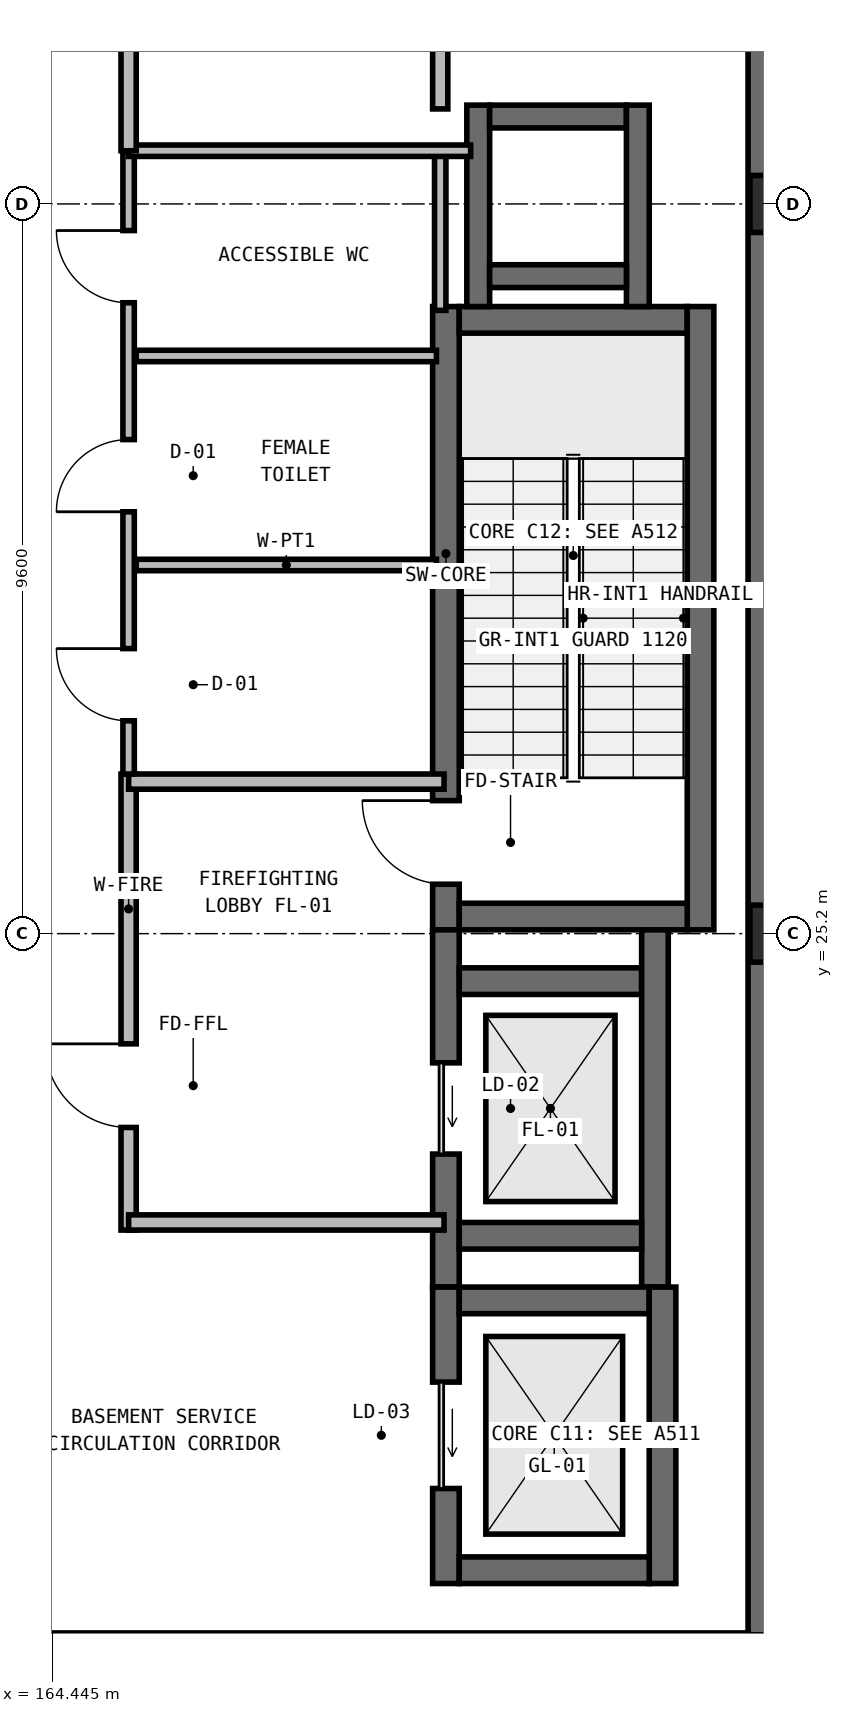
"""IFC4 building model, lengths in metres.
Left out: names, types, materials, properties, quantities, classifications, styles, units other than length and angle.
Written with IfcOpenShell. Run it as: python <this file> out.ifc"""

import sys

from ifc_helpers import new_model, si_unit, direction, frame, frame_2d, origin, origin_2d, place, context, subcontext, project, spatial, rectangle, extrude, element, fill, save


model = new_model("IFC4")
c1 = context("Model", 3, precision=1e-05, world=origin(), true_north=direction((0.0, 1.0)))
c2 = subcontext(c1, "Body", "Model", "MODEL_VIEW")
j1 = project(units=[si_unit("LENGTHUNIT", "METRE"), si_unit("PLANEANGLEUNIT", "RADIAN")], contexts=[c1])
p1 = place(None, origin())
s1 = spatial("IfcSite", under=j1, at=p1, CompositionType="ELEMENT")
p2 = place(p1, origin())
s2 = spatial("IfcBuilding", under=s1, at=p2, CompositionType="ELEMENT")
p3 = place(p2, frame((0.0, 0.0, -5.25)))
s3 = spatial("IfcBuildingStorey", under=s2, at=p3, CompositionType="ELEMENT", Elevation=-5.25)
p4 = place(p3, frame((169.625, 25.25, 0.0), z_axis=(0.0, 0.0, 1.0), x_axis=(0.0, 1.0, 0.0)))
e1 = element("IfcWall", 1, at=p4, inside=s3, PredefinedType="SHEAR", context=c2, shape_type="SweptSolid", body=[
    extrude(rectangle(XDim=8.2, YDim=0.35, at=frame_2d((4.1, 0.0))), origin(), (0.0, 0.0, 1.0), 5.25),
])
p5 = place(p4, frame((0.6, 0.0, 0.0)))
e2 = element("IfcOpeningElement", 2, at=p5, cuts=e1, PredefinedType="OPENING", context=c2, shape_type="SweptSolid", body=[
    extrude(rectangle(XDim=1.1, YDim=2.15, at=frame_2d((0.55, 1.075))), frame((0.0, 0.185, 0.0), z_axis=(0.0, -1.0, 0.0), x_axis=(1.0, 0.0, 0.0)), (0.0, 0.0, 1.0), 0.37),
])
p6 = place(p3, frame((169.8, 33.275, 0.0), z_axis=(0.0, 0.0, 1.0), x_axis=(1.0, 0.0, 0.0)))
e3 = element("IfcWall", 3, at=p6, inside=s3, PredefinedType="SHEAR", context=c2, shape_type="SweptSolid", body=[
    extrude(rectangle(XDim=3.0, YDim=0.35, at=frame_2d((1.5, 0.0))), origin(), (0.0, 0.0, 1.0), 5.25),
])
p7 = place(p3, frame((172.975, 33.45, 0.0), z_axis=(0.0, 0.0, 1.0), x_axis=(0.0, -1.0, 0.0)))
e4 = element("IfcWall", 4, at=p7, inside=s3, PredefinedType="SHEAR", context=c2, shape_type="SweptSolid", body=[
    extrude(rectangle(XDim=8.2, YDim=0.35, at=frame_2d((4.1, 0.0))), origin(), (0.0, 0.0, 1.0), 5.25),
])
p8 = place(p3, frame((172.8, 25.425, 0.0), z_axis=(0.0, 0.0, 1.0), x_axis=(-1.0, 0.0, 0.0)))
e5 = element("IfcWall", 5, at=p8, inside=s3, PredefinedType="SHEAR", context=c2, shape_type="SweptSolid", body=[
    extrude(rectangle(XDim=3.0, YDim=0.35, at=frame_2d((1.5, 0.0))), origin(), (0.0, 0.0, 1.0), 5.25),
])
p9 = place(p3, frame((169.625, 20.55, 0.0), z_axis=(0.0, 0.0, 1.0), x_axis=(0.0, 1.0, 0.0)))
e6 = element("IfcWall", 6, at=p9, inside=s3, PredefinedType="SHEAR", context=c2, shape_type="SweptSolid", body=[
    extrude(rectangle(XDim=4.7, YDim=0.35, at=frame_2d((2.35, 0.0))), origin(), (0.0, 0.0, 1.0), 5.25),
])
p10 = place(p9, frame((1.75, 0.0, 0.0)))
e7 = element("IfcOpeningElement", 7, at=p10, cuts=e6, PredefinedType="OPENING", context=c2, shape_type="SweptSolid", body=[
    extrude(rectangle(XDim=1.2, YDim=2.15, at=frame_2d((0.6, 1.075))), frame((0.0, 0.185, 0.0), z_axis=(0.0, -1.0, 0.0), x_axis=(1.0, 0.0, 0.0)), (0.0, 0.0, 1.0), 0.37),
])
p11 = place(p3, frame((169.8, 24.575, 0.0), z_axis=(0.0, 0.0, 1.0), x_axis=(1.0, 0.0, 0.0)))
e8 = element("IfcWall", 8, at=p11, inside=s3, PredefinedType="SHEAR", context=c2, shape_type="SweptSolid", body=[
    extrude(rectangle(XDim=2.4, YDim=0.35, at=frame_2d((1.2, 0.0))), origin(), (0.0, 0.0, 1.0), 5.25),
])
p12 = place(p3, frame((172.375, 25.25, 0.0), z_axis=(0.0, 0.0, 1.0), x_axis=(0.0, -1.0, 0.0)))
e9 = element("IfcWall", 9, at=p12, inside=s3, PredefinedType="SHEAR", context=c2, shape_type="SweptSolid", body=[
    extrude(rectangle(XDim=4.7, YDim=0.35, at=frame_2d((2.35, 0.0))), origin(), (0.0, 0.0, 1.0), 5.25),
])
p13 = place(p3, frame((172.2, 21.225, 0.0), z_axis=(0.0, 0.0, 1.0), x_axis=(-1.0, 0.0, 0.0)))
e10 = element("IfcWall", 10, at=p13, inside=s3, PredefinedType="SHEAR", context=c2, shape_type="SweptSolid", body=[
    extrude(rectangle(XDim=2.4, YDim=0.35, at=frame_2d((1.2, 0.0))), origin(), (0.0, 0.0, 1.0), 5.25),
])
p14 = place(p3, frame((169.625, 16.65, 0.0), z_axis=(0.0, 0.0, 1.0), x_axis=(0.0, 1.0, 0.0)))
e11 = element("IfcWall", 11, at=p14, inside=s3, PredefinedType="SHEAR", context=c2, shape_type="SweptSolid", body=[
    extrude(rectangle(XDim=3.9, YDim=0.35, at=frame_2d((1.95, 0.0))), origin(), (0.0, 0.0, 1.0), 5.25),
])
p15 = place(p14, frame((1.25, 0.0, 0.0)))
e12 = element("IfcOpeningElement", 12, at=p15, cuts=e11, PredefinedType="OPENING", context=c2, shape_type="SweptSolid", body=[
    extrude(rectangle(XDim=1.4, YDim=2.3, at=frame_2d((0.7, 1.15))), frame((0.0, 0.185, 0.0), z_axis=(0.0, -1.0, 0.0), x_axis=(1.0, 0.0, 0.0)), (0.0, 0.0, 1.0), 0.37),
])
p16 = place(p3, frame((169.8, 20.375, 0.0), z_axis=(0.0, 0.0, 1.0), x_axis=(1.0, 0.0, 0.0)))
e13 = element("IfcWall", 13, at=p16, inside=s3, PredefinedType="SHEAR", context=c2, shape_type="SweptSolid", body=[
    extrude(rectangle(XDim=2.5, YDim=0.35, at=frame_2d((1.25, 0.0))), origin(), (0.0, 0.0, 1.0), 5.25),
])
p17 = place(p3, frame((172.475, 20.55, 0.0), z_axis=(0.0, 0.0, 1.0), x_axis=(0.0, -1.0, 0.0)))
e14 = element("IfcWall", 14, at=p17, inside=s3, PredefinedType="SHEAR", context=c2, shape_type="SweptSolid", body=[
    extrude(rectangle(XDim=3.9, YDim=0.35, at=frame_2d((1.95, 0.0))), origin(), (0.0, 0.0, 1.0), 5.25),
])
p18 = place(p3, frame((172.3, 16.825, 0.0), z_axis=(0.0, 0.0, 1.0), x_axis=(-1.0, 0.0, 0.0)))
e15 = element("IfcWall", 15, at=p18, inside=s3, PredefinedType="SHEAR", context=c2, shape_type="SweptSolid", body=[
    extrude(rectangle(XDim=2.5, YDim=0.35, at=frame_2d((1.25, 0.0))), origin(), (0.0, 0.0, 1.0), 5.25),
])
p19 = place(p3, frame((173.8, 70.8, 0.0), z_axis=(0.0, 0.0, 1.0), x_axis=(0.0, -1.0, 0.0)))
e16 = element("IfcWall", 16, at=p19, inside=s3, PredefinedType="USERDEFINED", context=c2, shape_type="SweptSolid", body=[
    extrude(rectangle(XDim=55.2, YDim=0.4, at=frame_2d((27.6, 0.0))), origin(), (0.0, 0.0, 1.0), 5.25),
])
for number, where, z_axis, x_axis in (
    (17, (174.0, 25.2, 0.0), (0.0, 0.0, 1.0), (1.0, 0.0, 0.0)),
    (18, (174.0, 34.8, 0.0), (0.0, 0.0, 1.0), (1.0, 0.0, 0.0)),
):
    element("IfcColumn", number, at=place(p3, frame(where, z_axis=z_axis, x_axis=x_axis)), inside=s3, PredefinedType="COLUMN", context=c2, shape_type="SweptSolid", body=[
        extrude(rectangle(XDim=0.75, YDim=0.75, at=origin_2d()), origin(), (0.0, 0.0, 1.0), 5.25),
    ])
p20 = place(p3, frame((170.05, 33.45, 0.0), z_axis=(0.0, 0.0, 1.0), x_axis=(0.0, 1.0, 0.0)))
e19 = element("IfcWall", 19, at=p20, inside=s3, PredefinedType="SHEAR", context=c2, shape_type="SweptSolid", body=[
    extrude(rectangle(XDim=2.65, YDim=0.3, at=frame_2d((1.325, 0.0))), origin(), (0.0, 0.0, 1.0), 5.07),
])
p21 = place(p3, frame((170.2, 35.95, 0.0), z_axis=(0.0, 0.0, 1.0), x_axis=(1.0, 0.0, 0.0)))
e20 = element("IfcWall", 20, at=p21, inside=s3, PredefinedType="SHEAR", context=c2, shape_type="SweptSolid", body=[
    extrude(rectangle(XDim=1.8, YDim=0.3, at=frame_2d((0.9, 0.0))), origin(), (0.0, 0.0, 1.0), 5.07),
])
p22 = place(p3, frame((172.15, 36.1, 0.0), z_axis=(0.0, 0.0, 1.0), x_axis=(0.0, -1.0, 0.0)))
e21 = element("IfcWall", 21, at=p22, inside=s3, PredefinedType="SHEAR", context=c2, shape_type="SweptSolid", body=[
    extrude(rectangle(XDim=2.65, YDim=0.3, at=frame_2d((1.325, 0.0))), origin(), (0.0, 0.0, 1.0), 5.07),
])
p23 = place(p3, frame((172.0, 33.85, 0.0), z_axis=(0.0, 0.0, 1.0), x_axis=(-1.0, 0.0, 0.0)))
e22 = element("IfcWall", 22, at=p23, inside=s3, PredefinedType="SHEAR", context=c2, shape_type="SweptSolid", body=[
    extrude(rectangle(XDim=1.8, YDim=0.3, at=frame_2d((0.9, 0.0))), origin(), (0.0, 0.0, 1.0), 5.07),
])
p24 = place(p3, frame((165.45, 21.3, 0.0), z_axis=(0.0, 0.0, 1.0), x_axis=(0.0, 1.0, 0.0)))
e23 = element("IfcWall", 23, at=p24, inside=s3, PredefinedType="SOLIDWALL", context=c2, shape_type="SweptSolid", body=[
    extrude(rectangle(XDim=6.0, YDim=0.2, at=frame_2d((3.0, 0.0))), origin(), (0.0, 0.0, 1.0), 5.0),
])
p25 = place(p24, frame((1.35, 0.0, 0.0)))
e24 = element("IfcOpeningElement", 24, at=p25, cuts=e23, PredefinedType="OPENING", context=c2, shape_type="SweptSolid", body=[
    extrude(rectangle(XDim=1.1, YDim=2.15, at=frame_2d((0.55, 1.075))), frame((0.0, 0.11, 0.0), z_axis=(0.0, -1.0, 0.0), x_axis=(1.0, 0.0, 0.0)), (0.0, 0.0, 1.0), 0.22),
])
for number, where, z_axis, x_axis in (
    (25, (165.45, 21.4, 0.0), (0.0, 0.0, 1.0), (1.0, 0.0, 0.0)),
    (26, (165.45, 27.2, 0.0), (0.0, 0.0, 1.0), (1.0, 0.0, 0.0)),
):
    element("IfcWall", number, at=place(p3, frame(where, z_axis=z_axis, x_axis=x_axis)), inside=s3, PredefinedType="SOLIDWALL", context=c2, shape_type="SweptSolid", body=[
        extrude(rectangle(XDim=4.15, YDim=0.2, at=frame_2d((2.075, 0.0))), origin(), (0.0, 0.0, 1.0), 5.0),
    ])
for number, where, z_axis, x_axis in (
    (27, (165.55, 30.05, 0.0), (0.0, 0.0, 1.0), (1.0, 0.0, 0.0)),
    (28, (165.55, 32.8, 0.0), (0.0, 0.0, 1.0), (1.0, 0.0, 0.0)),
):
    element("IfcWall", number, at=place(p3, frame(where, z_axis=z_axis, x_axis=x_axis)), inside=s3, PredefinedType="PARTITIONING", context=c2, shape_type="SweptSolid", body=[
        extrude(rectangle(XDim=3.95, YDim=0.15, at=frame_2d((1.975, 0.0))), origin(), (0.0, 0.0, 1.0), 5.0),
    ])
p26 = place(p3, frame((165.45, 27.3, 0.0), z_axis=(0.0, 0.0, 1.0), x_axis=(0.0, 1.0, 0.0)))
e29 = element("IfcWall", 29, at=p26, inside=s3, PredefinedType="PARTITIONING", context=c2, shape_type="SweptSolid", body=[
    extrude(rectangle(XDim=8.2, YDim=0.15, at=frame_2d((4.1, 0.0))), origin(), (0.0, 0.0, 1.0), 5.0),
])
p27 = place(p26, frame((0.7, 0.0, 0.0)))
e30 = element("IfcOpeningElement", 30, at=p27, cuts=e29, PredefinedType="OPENING", context=c2, shape_type="SweptSolid", body=[
    extrude(rectangle(XDim=0.95, YDim=2.1, at=frame_2d((0.475, 1.05))), frame((0.0, 0.085, 0.0), z_axis=(0.0, -1.0, 0.0), x_axis=(1.0, 0.0, 0.0)), (0.0, 0.0, 1.0), 0.17),
])
p28 = place(p26, frame((3.45, 0.0, 0.0)))
e31 = element("IfcOpeningElement", 31, at=p28, cuts=e29, PredefinedType="OPENING", context=c2, shape_type="SweptSolid", body=[
    extrude(rectangle(XDim=0.95, YDim=2.1, at=frame_2d((0.475, 1.05))), frame((0.0, 0.085, 0.0), z_axis=(0.0, -1.0, 0.0), x_axis=(1.0, 0.0, 0.0)), (0.0, 0.0, 1.0), 0.17),
])
p29 = place(p26, frame((6.2, 0.0, 0.0)))
e32 = element("IfcOpeningElement", 32, at=p29, cuts=e29, PredefinedType="OPENING", context=c2, shape_type="SweptSolid", body=[
    extrude(rectangle(XDim=0.95, YDim=2.1, at=frame_2d((0.475, 1.05))), frame((0.0, 0.085, 0.0), z_axis=(0.0, -1.0, 0.0), x_axis=(1.0, 0.0, 0.0)), (0.0, 0.0, 1.0), 0.17),
])
p30 = place(p3, frame((169.55, 33.4, 0.0), z_axis=(0.0, 0.0, 1.0), x_axis=(0.0, 1.0, 0.0)))
e33 = element("IfcWall", 33, at=p30, inside=s3, PredefinedType="PARTITIONING", context=c2, shape_type="SweptSolid", body=[
    extrude(rectangle(XDim=2.15, YDim=0.15, at=frame_2d((1.075, 0.0))), origin(), (0.0, 0.0, 1.0), 5.0),
])
p31 = place(p3, frame((165.45, 35.5, 0.0), z_axis=(0.0, 0.0, 1.0), x_axis=(1.0, 0.0, 0.0)))
e34 = element("IfcWall", 34, at=p31, inside=s3, PredefinedType="PARTITIONING", context=c2, shape_type="SweptSolid", body=[
    extrude(rectangle(XDim=4.5, YDim=0.15, at=frame_2d((2.25, 0.0))), origin(), (0.0, 0.0, 1.0), 5.0),
])
p32 = place(p3, frame((165.45, 35.5, 0.0), z_axis=(0.0, 0.0, 1.0), x_axis=(0.0, 1.0, 0.0)))
e35 = element("IfcWall", 35, at=p32, inside=s3, PredefinedType="SOLIDWALL", context=c2, shape_type="SweptSolid", body=[
    extrude(rectangle(XDim=9.7, YDim=0.2, at=frame_2d((4.85, 0.0))), origin(), (0.0, 0.0, 1.0), 5.0),
])
p33 = place(p32, frame((3.4, 0.0, 0.0)))
e36 = element("IfcOpeningElement", 36, at=p33, cuts=e35, PredefinedType="OPENING", context=c2, shape_type="SweptSolid", body=[
    extrude(rectangle(XDim=1.2, YDim=2.2, at=frame_2d((0.6, 1.1))), frame((0.0, 0.11, 0.0), z_axis=(0.0, -1.0, 0.0), x_axis=(1.0, 0.0, 0.0)), (0.0, 0.0, 1.0), 0.22),
])
p34 = place(p3, frame((169.55, 36.05, 0.0), z_axis=(0.0, 0.0, 1.0), x_axis=(0.0, 1.0, 0.0)))
e37 = element("IfcWall", 37, at=p34, inside=s3, PredefinedType="SOLIDWALL", context=c2, shape_type="SweptSolid", body=[
    extrude(rectangle(XDim=5.5, YDim=0.2, at=frame_2d((2.75, 0.0))), origin(), (0.0, 0.0, 1.0), 5.0),
])
p35 = place(p5, origin())
e38 = element("IfcDoor", 38, at=p35, inside=s3, OperationType="SINGLE_SWING_RIGHT", PredefinedType="DOOR", context=c2, shape_type="SweptSolid", body=[
    extrude(rectangle(XDim=1.1, YDim=2.15, at=frame_2d((0.55, 1.075))), frame((0.0, 0.025, 0.0), z_axis=(0.0, -1.0, 0.0), x_axis=(1.0, 0.0, 0.0)), (0.0, 0.0, 1.0), 0.05),
])
fill(e2, e38)
p36 = place(p10, origin())
e39 = element("IfcDoor", 39, at=p36, inside=s3, OperationType="SLIDING_TO_LEFT", PredefinedType="USERDEFINED", context=c2, shape_type="SweptSolid", body=[
    extrude(rectangle(XDim=1.2, YDim=2.15, at=frame_2d((0.6, 1.075))), frame((0.0, 0.025, 0.0), z_axis=(0.0, -1.0, 0.0), x_axis=(1.0, 0.0, 0.0)), (0.0, 0.0, 1.0), 0.05),
])
fill(e7, e39)
p37 = place(p15, origin())
e40 = element("IfcDoor", 40, at=p37, inside=s3, OperationType="SLIDING_TO_LEFT", PredefinedType="USERDEFINED", context=c2, shape_type="SweptSolid", body=[
    extrude(rectangle(XDim=1.4, YDim=2.3, at=frame_2d((0.7, 1.15))), frame((0.0, 0.025, 0.0), z_axis=(0.0, -1.0, 0.0), x_axis=(1.0, 0.0, 0.0)), (0.0, 0.0, 1.0), 0.05),
])
fill(e12, e40)
p38 = place(p25, origin())
e41 = element("IfcDoor", 41, at=p38, inside=s3, OperationType="SINGLE_SWING_RIGHT", PredefinedType="DOOR", context=c2, shape_type="SweptSolid", body=[
    extrude(rectangle(XDim=1.1, YDim=2.15, at=frame_2d((0.55, 1.075))), frame((0.0, 0.025, 0.0), z_axis=(0.0, -1.0, 0.0), x_axis=(1.0, 0.0, 0.0)), (0.0, 0.0, 1.0), 0.05),
])
fill(e24, e41)
p39 = place(p27, origin())
e42 = element("IfcDoor", 42, at=p39, inside=s3, OperationType="SINGLE_SWING_RIGHT", PredefinedType="DOOR", context=c2, shape_type="SweptSolid", body=[
    extrude(rectangle(XDim=0.95, YDim=2.1, at=frame_2d((0.475, 1.05))), frame((0.0, 0.025, 0.0), z_axis=(0.0, -1.0, 0.0), x_axis=(1.0, 0.0, 0.0)), (0.0, 0.0, 1.0), 0.05),
])
fill(e30, e42)
p40 = place(p28, origin())
e43 = element("IfcDoor", 43, at=p40, inside=s3, OperationType="SINGLE_SWING_LEFT", PredefinedType="DOOR", context=c2, shape_type="SweptSolid", body=[
    extrude(rectangle(XDim=0.95, YDim=2.1, at=frame_2d((0.475, 1.05))), frame((0.0, 0.025, 0.0), z_axis=(0.0, -1.0, 0.0), x_axis=(1.0, 0.0, 0.0)), (0.0, 0.0, 1.0), 0.05),
])
fill(e31, e43)
p41 = place(p29, origin())
e44 = element("IfcDoor", 44, at=p41, inside=s3, OperationType="SINGLE_SWING_RIGHT", PredefinedType="DOOR", context=c2, shape_type="SweptSolid", body=[
    extrude(rectangle(XDim=0.95, YDim=2.1, at=frame_2d((0.475, 1.05))), frame((0.0, 0.025, 0.0), z_axis=(0.0, -1.0, 0.0), x_axis=(1.0, 0.0, 0.0)), (0.0, 0.0, 1.0), 0.05),
])
fill(e32, e44)
save(model, sys.argv[1])
